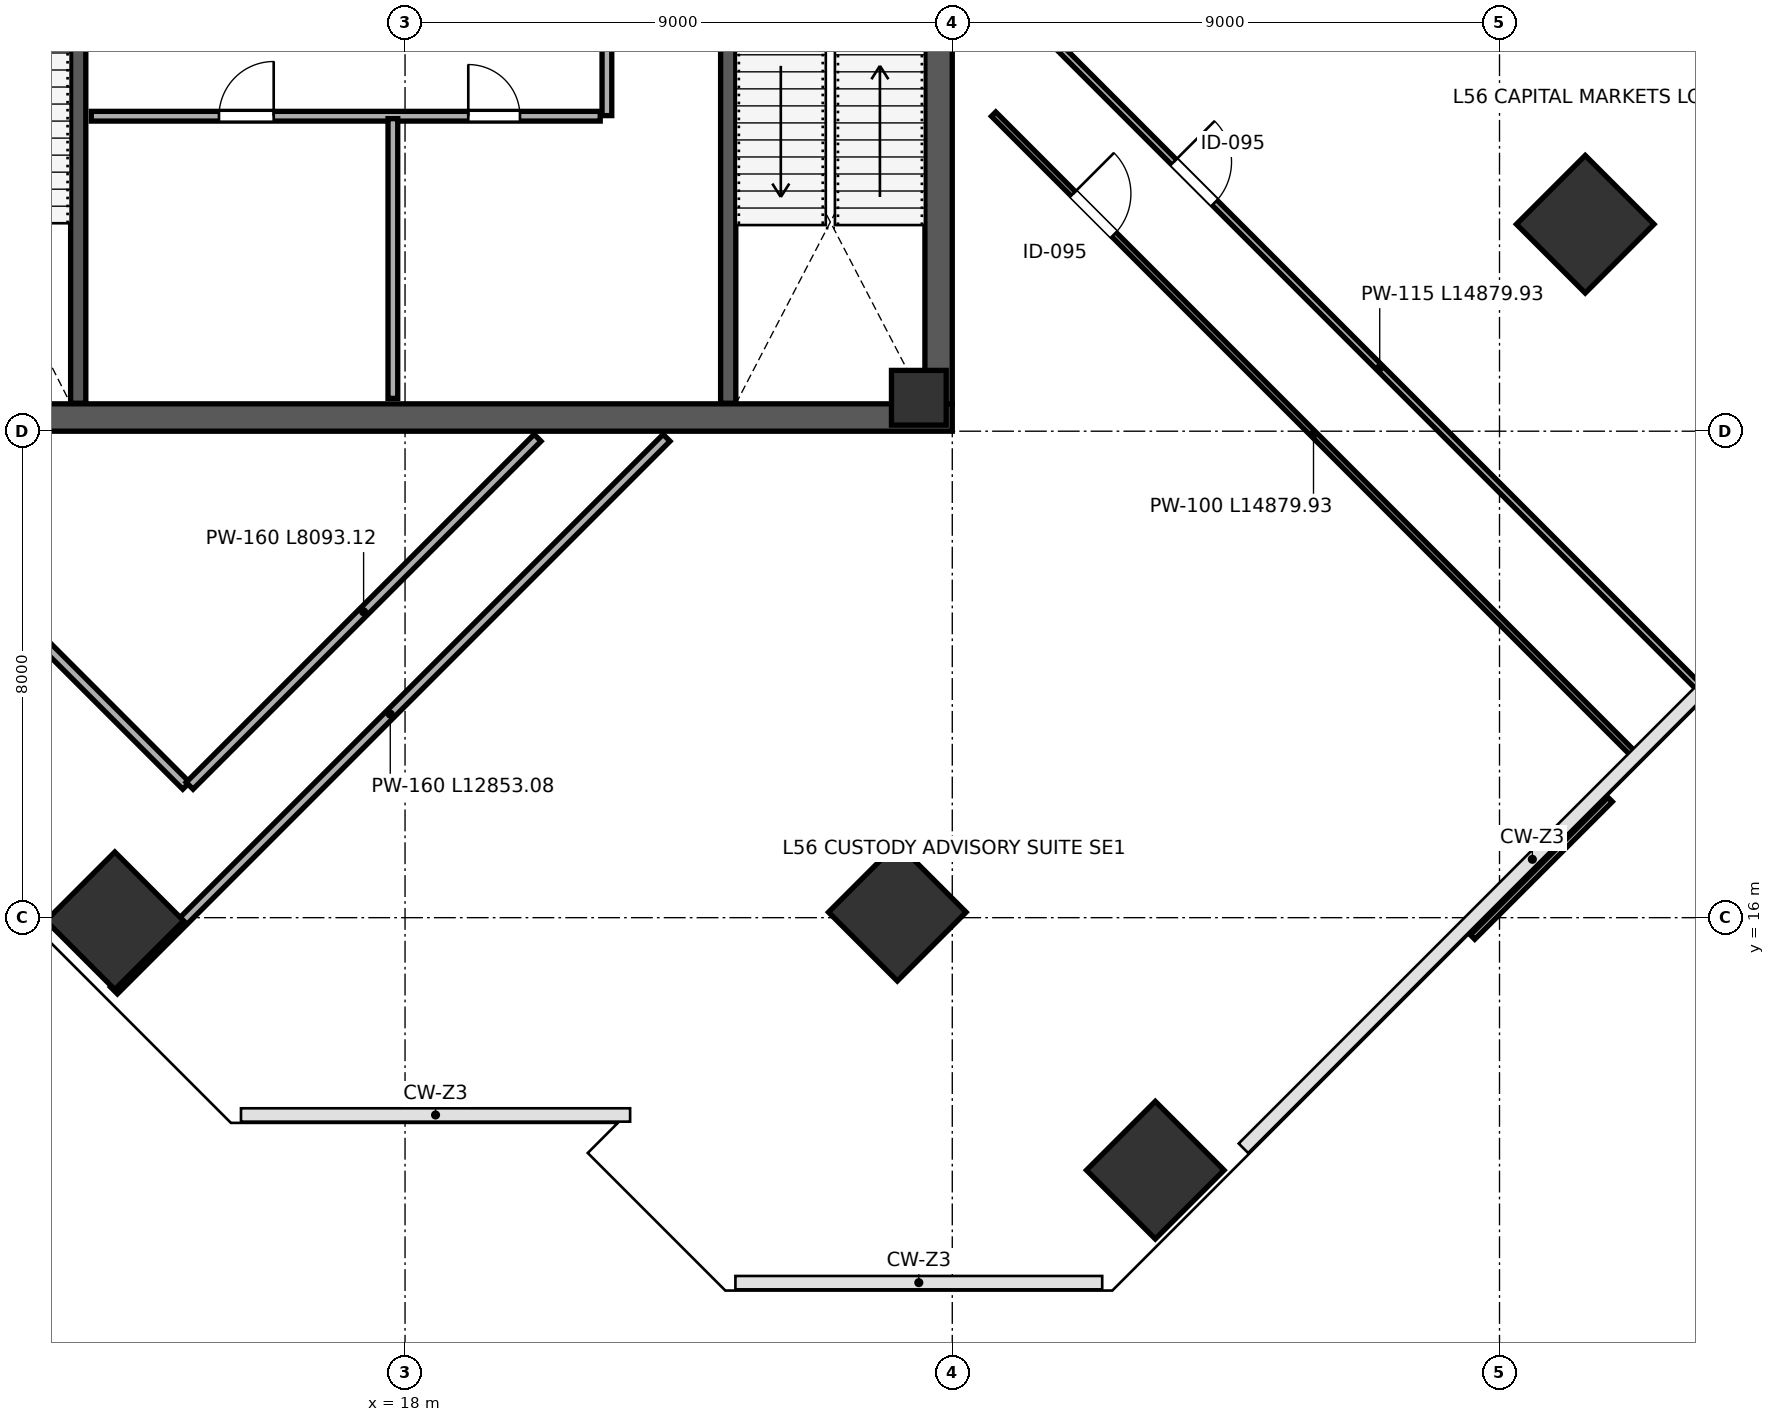
"""IFC4 building model, lengths in metres.
Left out: names, types, materials, properties, quantities, classifications, styles, units other than length and angle.
Written with IfcOpenShell. Run it as: python <this file> out.ifc"""

import sys

from ifc_helpers import new_model, si_unit, direction, frame, frame_2d, origin, origin_2d, place, context, subcontext, project, spatial, rectangle, extrude, source, transform, mapped, element, fill, save


model = new_model("IFC4")
c1 = context("Model", 3, precision=1e-05, world=origin(), true_north=direction((0.0, 1.0)))
c2 = subcontext(c1, "Body", "Model", "MODEL_VIEW")
j1 = project(units=[si_unit("LENGTHUNIT", "METRE"), si_unit("PLANEANGLEUNIT", "RADIAN")], contexts=[c1])
p1 = place(None, origin())
s1 = spatial("IfcSite", under=j1, at=p1, CompositionType="ELEMENT")
p2 = place(p1, origin())
s2 = spatial("IfcBuilding", under=s1, at=p2, CompositionType="ELEMENT")
p3 = place(p2, frame((0.0, 0.0, 250.0)))
s3 = spatial("IfcBuildingStorey", under=s2, at=p3, CompositionType="ELEMENT", Elevation=250.0)
m1 = source(origin(), c2, "Body", "SweptSolid", [
    extrude(rectangle(XDim=0.9, YDim=0.9, at=origin_2d()), origin(), (0.0, 0.0, 1.0), 4.198),
])
p4 = place(p3, frame((26.45, 24.55, 0.001), z_axis=(0.0, 0.0, 1.0), x_axis=(1.0, 0.0, 0.0)))
e1 = element("IfcColumn", 1, at=p4, inside=s3, PredefinedType="COLUMN", context=c2, shape_type="MappedRepresentation", body=[
    mapped(m1, transform((0.0, 0.0, 0.0), scale=1.0)),
])
m2 = source(origin(), c2, "Body", "SweptSolid", [
    extrude(rectangle(XDim=1.6, YDim=1.6, at=origin_2d()), origin(), (0.0, 0.0, 1.0), 4.198),
])
p5 = place(p3, frame((13.227, 15.949, 0.001), z_axis=(0.0, 0.0, 1.0), x_axis=(-0.707106781187, 0.707106781187, 0.0)))
e2 = element("IfcColumn", 2, at=p5, inside=s3, PredefinedType="COLUMN", context=c2, shape_type="MappedRepresentation", body=[
    mapped(m2, transform((0.0, 0.0, 0.0), scale=1.0)),
])
m3 = source(origin(), c2, "Body", "SweptSolid", [
    extrude(rectangle(XDim=1.6, YDim=1.6, at=origin_2d()), origin(), (0.0, 0.0, 1.0), 4.198),
])
for number, where, z_axis, x_axis in (
    (3, (26.096, 16.09, 0.001), (0.0, 0.0, 1.0), (-0.707, 0.707, 0.0)),
    (4, (37.41, 27.404, 0.001), (0.0, 0.0, 1.0), (-0.707, 0.707, 0.0)),
):
    element("IfcColumn", number, at=place(p3, frame(where, z_axis=z_axis, x_axis=x_axis)), inside=s3, PredefinedType="COLUMN", context=c2, shape_type="MappedRepresentation", body=[
        mapped(m3, transform((0.0, 0.0, 0.0), scale=1.0)),
    ])
p6 = place(p3, frame((30.339, 11.847, 0.001), z_axis=(0.0, 0.0, 1.0), x_axis=(-0.707106781187, 0.707106781187, 0.0)))
e5 = element("IfcColumn", 5, at=p6, inside=s3, PredefinedType="COLUMN", context=c2, shape_type="MappedRepresentation", body=[
    mapped(m2, transform((0.0, 0.0, 0.0), scale=1.0)),
])
p7 = place(p3, frame((26.775, 24.45, 0.0), z_axis=(0.0, 0.0, 1.0), x_axis=(0.0, 1.0, 0.0)))
e6 = element("IfcWall", 6, at=p7, inside=s3, PredefinedType="SHEAR", context=c2, shape_type="SweptSolid", body=[
    extrude(rectangle(XDim=15.1, YDim=0.45, at=frame_2d((7.55, 0.0))), origin(), (0.0, 0.0, 1.0), 3.96),
])
p8 = place(p7, frame((8.6, 0.0, 0.0)))
e7 = element("IfcOpeningElement", 7, at=p8, cuts=e6, PredefinedType="OPENING", context=c2, shape_type="SweptSolid", body=[
    extrude(rectangle(XDim=1.15, YDim=2.2, at=frame_2d((0.575, 1.1))), frame((0.0, 0.235, 0.0), z_axis=(0.0, -1.0, 0.0), x_axis=(1.0, 0.0, 0.0)), (0.0, 0.0, 1.0), 0.47),
])
p9 = place(p3, frame((9.0, 24.225, 0.0), z_axis=(0.0, 0.0, 1.0), x_axis=(1.0, 0.0, 0.0)))
e8 = element("IfcWall", 8, at=p9, inside=s3, PredefinedType="SHEAR", context=c2, shape_type="SweptSolid", body=[
    extrude(rectangle(XDim=18.0, YDim=0.45, at=frame_2d((9.0, 0.0))), origin(), (0.0, 0.0, 1.0), 3.96),
])
p10 = place(p3, frame((12.625, 24.46, 0.0), z_axis=(0.0, 0.0, 1.0), x_axis=(0.0, 1.0, 0.0)))
e9 = element("IfcWall", 9, at=p10, inside=s3, PredefinedType="SHEAR", context=c2, shape_type="SweptSolid", body=[
    extrude(rectangle(XDim=7.49, YDim=0.25, at=frame_2d((3.745, 0.0))), origin(), (0.0, 0.0, 1.0), 3.96),
])
p11 = place(p10, frame((5.85, 0.0, 0.0)))
e10 = element("IfcOpeningElement", 10, at=p11, cuts=e9, PredefinedType="OPENING", context=c2, shape_type="SweptSolid", body=[
    extrude(rectangle(XDim=1.15, YDim=2.2, at=frame_2d((0.575, 1.1))), frame((0.0, 0.135, 0.0), z_axis=(0.0, -1.0, 0.0), x_axis=(1.0, 0.0, 0.0)), (0.0, 0.0, 1.0), 0.27),
])
p12 = place(p3, frame((23.315, 24.46, 0.0), z_axis=(0.0, 0.0, 1.0), x_axis=(0.0, 1.0, 0.0)))
e11 = element("IfcWall", 11, at=p12, inside=s3, PredefinedType="SHEAR", context=c2, shape_type="SweptSolid", body=[
    extrude(rectangle(XDim=7.49, YDim=0.25, at=frame_2d((3.745, 0.0))), origin(), (0.0, 0.0, 1.0), 3.96),
])
p13 = place(p3, frame((12.84, 29.18, 0.0), z_axis=(0.0, 0.0, 1.0), x_axis=(1.0, 0.0, 0.0)))
e12 = element("IfcWall", 12, at=p13, inside=s3, PredefinedType="PARTITIONING", context=c2, shape_type="SweptSolid", body=[
    extrude(rectangle(XDim=8.37, YDim=0.16, at=frame_2d((4.185, 0.0))), origin(), (0.0, 0.0, 1.0), 3.96),
])
p14 = place(p13, frame((2.1, 0.0, 0.0)))
e13 = element("IfcOpeningElement", 13, at=p14, cuts=e12, PredefinedType="OPENING", context=c2, shape_type="SweptSolid", body=[
    extrude(rectangle(XDim=0.9, YDim=2.15, at=frame_2d((0.45, 1.075))), frame((0.0, 0.09, 0.0), z_axis=(0.0, -1.0, 0.0), x_axis=(1.0, 0.0, 0.0)), (0.0, 0.0, 1.0), 0.18),
])
p15 = place(p13, frame((6.2, 0.0, 0.0)))
e14 = element("IfcOpeningElement", 14, at=p15, cuts=e12, PredefinedType="OPENING", context=c2, shape_type="SweptSolid", body=[
    extrude(rectangle(XDim=0.85, YDim=2.1, at=frame_2d((0.425, 1.05))), frame((0.0, 0.09, 0.0), z_axis=(0.0, -1.0, 0.0), x_axis=(1.0, 0.0, 0.0)), (0.0, 0.0, 1.0), 0.18),
])
p16 = place(p3, frame((17.8, 24.54, 0.0), z_axis=(0.0, 0.0, 1.0), x_axis=(0.0, 1.0, 0.0)))
e15 = element("IfcWall", 15, at=p16, inside=s3, PredefinedType="PARTITIONING", context=c2, shape_type="SweptSolid", body=[
    extrude(rectangle(XDim=4.6, YDim=0.16, at=frame_2d((2.3, 0.0))), origin(), (0.0, 0.0, 1.0), 3.96),
])
p17 = place(p3, frame((21.32, 29.19, 0.0), z_axis=(0.0, 0.0, 1.0), x_axis=(0.0, 1.0, 0.0)))
e16 = element("IfcWall", 16, at=p17, inside=s3, PredefinedType="PARTITIONING", context=c2, shape_type="SweptSolid", body=[
    extrude(rectangle(XDim=2.92, YDim=0.16, at=frame_2d((1.46, 0.0))), origin(), (0.0, 0.0, 1.0), 3.96),
])
p18 = place(p3, frame((4.452, 28.118, 0.0), z_axis=(0.0, 0.0, 1.0), x_axis=(0.707106781187, -0.707106781187, 0.0)))
e17 = element("IfcWall", 17, at=p18, inside=s3, PredefinedType="PARTITIONING", context=c2, shape_type="SweptSolid", body=[
    extrude(rectangle(XDim=14.07, YDim=0.16, at=frame_2d((7.035, 0.0))), origin(), (0.0, 0.0, 1.0), 3.96),
])
p19 = place(p18, frame((1.15, 0.0, 0.0)))
e18 = element("IfcOpeningElement", 18, at=p19, cuts=e17, PredefinedType="OPENING", context=c2, shape_type="SweptSolid", body=[
    extrude(rectangle(XDim=0.95, YDim=2.15, at=frame_2d((0.475, 1.075))), frame((0.0, 0.09, 0.0), z_axis=(0.0, -1.0, 0.0), x_axis=(1.0, 0.0, 0.0)), (0.0, 0.0, 1.0), 0.18),
])
p20 = place(p3, frame((14.457, 18.169, 0.0), z_axis=(0.0, 0.0, 1.0), x_axis=(0.707106781187, 0.707106781187, 0.0)))
e19 = element("IfcWall", 19, at=p20, inside=s3, PredefinedType="PARTITIONING", context=c2, shape_type="SweptSolid", body=[
    extrude(rectangle(XDim=8.093, YDim=0.16, at=frame_2d((4.046, 0.0))), origin(), (0.0, 0.0, 1.0), 3.96),
])
p21 = place(p3, frame((13.213, 14.803, 0.0), z_axis=(0.0, 0.0, 1.0), x_axis=(0.707116278481, 0.707097283765, 0.0)))
e20 = element("IfcWall", 20, at=p21, inside=s3, PredefinedType="PARTITIONING", context=c2, shape_type="SweptSolid", body=[
    extrude(rectangle(XDim=12.853, YDim=0.16, at=frame_2d((6.427, 0.0))), origin(), (0.0, 0.0, 1.0), 3.96),
])
p22 = place(p3, frame((28.769, 30.303, 0.0), z_axis=(0.0, 0.0, 1.0), x_axis=(0.707106781187, -0.707106781187, 0.0)))
e21 = element("IfcWall", 21, at=p22, inside=s3, PredefinedType="PARTITIONING", context=c2, shape_type="SweptSolid", body=[
    extrude(rectangle(XDim=14.88, YDim=0.115, at=frame_2d((7.44, 0.0))), origin(), (0.0, 0.0, 1.0), 3.96),
])
p23 = place(p22, frame((2.65, 0.0, 0.0)))
e22 = element("IfcOpeningElement", 22, at=p23, cuts=e21, PredefinedType="OPENING", context=c2, shape_type="SweptSolid", body=[
    extrude(rectangle(XDim=0.95, YDim=2.15, at=frame_2d((0.475, 1.075))), frame((0.0, 0.067, 0.0), z_axis=(0.0, -1.0, 0.0), x_axis=(1.0, 0.0, 0.0)), (0.0, 0.0, 1.0), 0.135),
])
p24 = place(p3, frame((27.68, 29.214, 0.0), z_axis=(0.0, 0.0, 1.0), x_axis=(0.707106781187, -0.707106781187, 0.0)))
e23 = element("IfcWall", 23, at=p24, inside=s3, PredefinedType="PARTITIONING", context=c2, shape_type="SweptSolid", body=[
    extrude(rectangle(XDim=14.88, YDim=0.1, at=frame_2d((7.44, 0.0))), origin(), (0.0, 0.0, 1.0), 3.96),
])
p25 = place(p24, frame((1.85, 0.0, 0.0)))
e24 = element("IfcOpeningElement", 24, at=p25, cuts=e23, PredefinedType="OPENING", context=c2, shape_type="SweptSolid", body=[
    extrude(rectangle(XDim=0.95, YDim=2.15, at=frame_2d((0.475, 1.075))), frame((0.0, 0.06, 0.0), z_axis=(0.0, -1.0, 0.0), x_axis=(1.0, 0.0, 0.0)), (0.0, 0.0, 1.0), 0.12),
])
m4 = source(origin(), c2, "Body", "SweptSolid", [
    extrude(rectangle(XDim=0.9, YDim=2.15, at=frame_2d((0.45, 1.075))), frame((0.0, 0.025, 0.0), z_axis=(0.0, -1.0, 0.0), x_axis=(1.0, 0.0, 0.0)), (0.0, 0.0, 1.0), 0.05),
])
p26 = place(p14, origin())
e25 = element("IfcDoor", 25, at=p26, inside=s3, OperationType="SINGLE_SWING_RIGHT", PredefinedType="DOOR", context=c2, shape_type="MappedRepresentation", body=[
    mapped(m4, transform((0.0, 0.0, 0.0), scale=1.0)),
])
fill(e13, e25)
m5 = source(origin(), c2, "Body", "SweptSolid", [
    extrude(rectangle(XDim=0.85, YDim=2.1, at=frame_2d((0.425, 1.05))), frame((0.0, 0.025, 0.0), z_axis=(0.0, -1.0, 0.0), x_axis=(1.0, 0.0, 0.0)), (0.0, 0.0, 1.0), 0.05),
])
p27 = place(p15, origin())
e26 = element("IfcDoor", 26, at=p27, inside=s3, OperationType="SINGLE_SWING_LEFT", PredefinedType="DOOR", context=c2, shape_type="MappedRepresentation", body=[
    mapped(m5, transform((0.0, 0.0, 0.0), scale=1.0)),
])
fill(e14, e26)
m6 = source(origin(), c2, "Body", "SweptSolid", [
    extrude(rectangle(XDim=0.95, YDim=2.15, at=frame_2d((0.475, 1.075))), frame((0.0, 0.025, 0.0), z_axis=(0.0, -1.0, 0.0), x_axis=(1.0, 0.0, 0.0)), (0.0, 0.0, 1.0), 0.05),
])
p28 = place(p23, origin())
e27 = element("IfcDoor", 27, at=p28, inside=s3, OperationType="SINGLE_SWING_LEFT", PredefinedType="DOOR", context=c2, shape_type="MappedRepresentation", body=[
    mapped(m6, transform((0.0, 0.0, 0.0), scale=1.0)),
])
fill(e22, e27)
p29 = place(p25, origin())
e28 = element("IfcDoor", 28, at=p29, inside=s3, OperationType="SINGLE_SWING_LEFT", PredefinedType="DOOR", context=c2, shape_type="MappedRepresentation", body=[
    mapped(m6, transform((0.0, 0.0, 0.0), scale=1.0)),
])
fill(e24, e28)
save(model, sys.argv[1])
